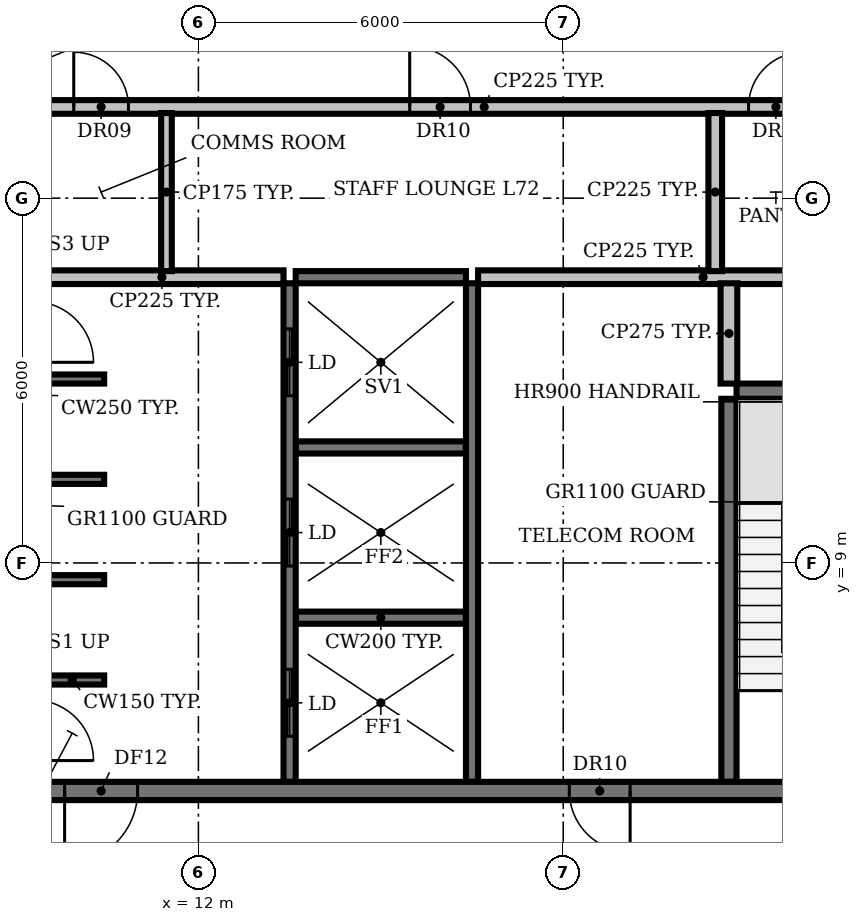
"""IFC4 building model, lengths in metres.
Left out: names, types, materials, properties, quantities, classifications, styles, units other than length and angle.
Written with IfcOpenShell. Run it as: python <this file> out.ifc"""

import sys

from ifc_helpers import new_model, si_unit, direction, frame, frame_2d, origin, place, context, subcontext, project, spatial, rectangle, extrude, element, fill, save


model = new_model("IFC4")
c1 = context("Model", 3, precision=1e-05, world=origin(), true_north=direction((0.0, 1.0)))
c2 = subcontext(c1, "Body", "Model", "MODEL_VIEW")
j1 = project(units=[si_unit("LENGTHUNIT", "METRE"), si_unit("PLANEANGLEUNIT", "RADIAN")], contexts=[c1])
p1 = place(None, origin())
s1 = spatial("IfcSite", under=j1, at=p1, CompositionType="ELEMENT")
p2 = place(p1, origin())
s2 = spatial("IfcBuilding", under=s1, at=p2, CompositionType="ELEMENT")
p3 = place(p2, frame((0.0, 0.0, 323.0)))
s3 = spatial("IfcBuildingStorey", under=s2, at=p3, CompositionType="ELEMENT", Elevation=323.0)
p4 = place(p3, frame((9.4, 7.075, 0.0), z_axis=(0.0, 0.0, 1.0), x_axis=(1.0, 0.0, 0.0)))
e1 = element("IfcWall", 1, at=p4, inside=s3, PredefinedType="SHEAR", context=c2, shape_type="SweptSolid", body=[
    extrude(rectangle(XDim=1.05, YDim=0.15, at=frame_2d((0.525, 0.0))), origin(), (0.0, 0.0, 1.0), 3.9),
])
p5 = place(p3, frame((13.6, 8.1, 0.0), z_axis=(0.0, 0.0, 1.0), x_axis=(1.0, 0.0, 0.0)))
e2 = element("IfcWall", 2, at=p5, inside=s3, PredefinedType="SHEAR", context=c2, shape_type="SweptSolid", body=[
    extrude(rectangle(XDim=2.8, YDim=0.2, at=frame_2d((1.4, 0.0))), origin(), (0.0, 0.0, 1.0), 3.9),
])
for number, where, z_axis, x_axis in (
    (3, (9.4, 8.725, 0.0), (0.0, 0.0, 1.0), (1.0, 0.0, 0.0)),
    (4, (9.4, 10.375, 0.0), (0.0, 0.0, 1.0), (1.0, 0.0, 0.0)),
):
    element("IfcWall", number, at=place(p3, frame(where, z_axis=z_axis, x_axis=x_axis)), inside=s3, PredefinedType="SHEAR", context=c2, shape_type="SweptSolid", body=[
        extrude(rectangle(XDim=1.05, YDim=0.15, at=frame_2d((0.525, 0.0))), origin(), (0.0, 0.0, 1.0), 3.9),
    ])
p6 = place(p3, frame((13.6, 10.9, 0.0), z_axis=(0.0, 0.0, 1.0), x_axis=(1.0, 0.0, 0.0)))
e5 = element("IfcWall", 5, at=p6, inside=s3, PredefinedType="SHEAR", context=c2, shape_type="SweptSolid", body=[
    extrude(rectangle(XDim=2.8, YDim=0.2, at=frame_2d((1.4, 0.0))), origin(), (0.0, 0.0, 1.0), 3.9),
])
p7 = place(p3, frame((20.85, 11.825, 0.0), z_axis=(0.0, 0.0, 1.0), x_axis=(1.0, 0.0, 0.0)))
e6 = element("IfcWall", 6, at=p7, inside=s3, PredefinedType="SHEAR", context=c2, shape_type="SweptSolid", body=[
    extrude(rectangle(XDim=3.15, YDim=0.25, at=frame_2d((1.575, 0.0))), origin(), (0.0, 0.0, 1.0), 3.9),
])
p8 = place(p3, frame((9.4, 12.025, 0.0), z_axis=(0.0, 0.0, 1.0), x_axis=(1.0, 0.0, 0.0)))
e7 = element("IfcWall", 7, at=p8, inside=s3, PredefinedType="SHEAR", context=c2, shape_type="SweptSolid", body=[
    extrude(rectangle(XDim=1.05, YDim=0.15, at=frame_2d((0.525, 0.0))), origin(), (0.0, 0.0, 1.0), 3.9),
])
p9 = place(p3, frame((9.4, 13.7, 0.0), z_axis=(0.0, 0.0, 1.0), x_axis=(1.0, 0.0, 0.0)))
e8 = element("IfcWall", 8, at=p9, inside=s3, PredefinedType="PARTITIONING", context=c2, shape_type="SweptSolid", body=[
    extrude(rectangle(XDim=4.0, YDim=0.225, at=frame_2d((2.0, 0.0))), origin(), (0.0, 0.0, 1.0), 3.9),
])
p10 = place(p3, frame((13.6, 13.7, 0.0), z_axis=(0.0, 0.0, 1.0), x_axis=(1.0, 0.0, 0.0)))
e9 = element("IfcWall", 9, at=p10, inside=s3, PredefinedType="SHEAR", context=c2, shape_type="SweptSolid", body=[
    extrude(rectangle(XDim=2.8, YDim=0.2, at=frame_2d((1.4, 0.0))), origin(), (0.0, 0.0, 1.0), 3.9),
])
p11 = place(p3, frame((16.6, 13.7, 0.0), z_axis=(0.0, 0.0, 1.0), x_axis=(1.0, 0.0, 0.0)))
e10 = element("IfcWall", 10, at=p11, inside=s3, PredefinedType="PARTITIONING", context=c2, shape_type="SweptSolid", body=[
    extrude(rectangle(XDim=7.4, YDim=0.225, at=frame_2d((3.7, 0.0))), origin(), (0.0, 0.0, 1.0), 3.9),
])
p12 = place(p3, frame((9.4, 16.5, 0.0), z_axis=(0.0, 0.0, 1.0), x_axis=(1.0, 0.0, 0.0)))
e11 = element("IfcWall", 11, at=p12, inside=s3, PredefinedType="PARTITIONING", context=c2, shape_type="SweptSolid", body=[
    extrude(rectangle(XDim=14.6, YDim=0.225, at=frame_2d((7.3, 0.0))), origin(), (0.0, 0.0, 1.0), 3.9),
])
p13 = place(p12, frame((0.55, 0.0, 0.0)))
e12 = element("IfcOpeningElement", 12, at=p13, cuts=e11, PredefinedType="OPENING", context=c2, shape_type="SweptSolid", body=[
    extrude(rectangle(XDim=0.9, YDim=2.1, at=frame_2d((0.45, 1.05))), frame((0.0, 0.123, 0.0), z_axis=(0.0, -1.0, 0.0), x_axis=(1.0, 0.0, 0.0)), (0.0, 0.0, 1.0), 0.245),
])
p14 = place(p12, frame((6.075, 0.0, 0.0)))
e13 = element("IfcOpeningElement", 13, at=p14, cuts=e11, PredefinedType="OPENING", context=c2, shape_type="SweptSolid", body=[
    extrude(rectangle(XDim=1.0, YDim=2.1, at=frame_2d((0.5, 1.05))), frame((0.0, 0.123, 0.0), z_axis=(0.0, -1.0, 0.0), x_axis=(1.0, 0.0, 0.0)), (0.0, 0.0, 1.0), 0.245),
])
p15 = place(p12, frame((11.647, 0.0, 0.0)))
e14 = element("IfcOpeningElement", 14, at=p15, cuts=e11, PredefinedType="OPENING", context=c2, shape_type="SweptSolid", body=[
    extrude(rectangle(XDim=0.9, YDim=2.1, at=frame_2d((0.45, 1.05))), frame((0.0, 0.123, 0.0), z_axis=(0.0, -1.0, 0.0), x_axis=(1.0, 0.0, 0.0)), (0.0, 0.0, 1.0), 0.245),
])
p16 = place(p12, frame((13.423, 0.0, 0.0)))
e15 = element("IfcOpeningElement", 15, at=p16, cuts=e11, PredefinedType="OPENING", context=c2, shape_type="SweptSolid", body=[
    extrude(rectangle(XDim=0.9, YDim=2.1, at=frame_2d((0.45, 1.05))), frame((0.0, 0.123, 0.0), z_axis=(0.0, -1.0, 0.0), x_axis=(1.0, 0.0, 0.0)), (0.0, 0.0, 1.0), 0.245),
])
p17 = place(p3, frame((11.475, 13.8, 0.0), z_axis=(0.0, 0.0, 1.0), x_axis=(0.0, 1.0, 0.0)))
e16 = element("IfcWall", 16, at=p17, inside=s3, PredefinedType="PARTITIONING", context=c2, shape_type="SweptSolid", body=[
    extrude(rectangle(XDim=2.6, YDim=0.175, at=frame_2d((1.3, 0.0))), origin(), (0.0, 0.0, 1.0), 3.9),
])
p18 = place(p3, frame((13.5, 5.4, 0.0), z_axis=(0.0, 0.0, 1.0), x_axis=(0.0, 1.0, 0.0)))
e17 = element("IfcWall", 17, at=p18, inside=s3, PredefinedType="SHEAR", context=c2, shape_type="SweptSolid", body=[
    extrude(rectangle(XDim=8.2, YDim=0.2, at=frame_2d((4.1, 0.0))), origin(), (0.0, 0.0, 1.0), 3.9),
])
p19 = place(p18, frame((0.75, 0.0, 0.0)))
e18 = element("IfcOpeningElement", 18, at=p19, cuts=e17, PredefinedType="OPENING", context=c2, shape_type="SweptSolid", body=[
    extrude(rectangle(XDim=1.1, YDim=2.1, at=frame_2d((0.55, 1.05))), frame((0.0, 0.11, 0.0), z_axis=(0.0, -1.0, 0.0), x_axis=(1.0, 0.0, 0.0)), (0.0, 0.0, 1.0), 0.22),
])
p20 = place(p18, frame((3.55, 0.0, 0.0)))
e19 = element("IfcOpeningElement", 19, at=p20, cuts=e17, PredefinedType="OPENING", context=c2, shape_type="SweptSolid", body=[
    extrude(rectangle(XDim=1.1, YDim=2.1, at=frame_2d((0.55, 1.05))), frame((0.0, 0.11, 0.0), z_axis=(0.0, -1.0, 0.0), x_axis=(1.0, 0.0, 0.0)), (0.0, 0.0, 1.0), 0.22),
])
p21 = place(p18, frame((6.35, 0.0, 0.0)))
e20 = element("IfcOpeningElement", 20, at=p21, cuts=e17, PredefinedType="OPENING", context=c2, shape_type="SweptSolid", body=[
    extrude(rectangle(XDim=1.1, YDim=2.1, at=frame_2d((0.55, 1.05))), frame((0.0, 0.11, 0.0), z_axis=(0.0, -1.0, 0.0), x_axis=(1.0, 0.0, 0.0)), (0.0, 0.0, 1.0), 0.22),
])
p22 = place(p3, frame((16.5, 5.4, 0.0), z_axis=(0.0, 0.0, 1.0), x_axis=(0.0, 1.0, 0.0)))
e21 = element("IfcWall", 21, at=p22, inside=s3, PredefinedType="SHEAR", context=c2, shape_type="SweptSolid", body=[
    extrude(rectangle(XDim=8.2, YDim=0.2, at=frame_2d((4.1, 0.0))), origin(), (0.0, 0.0, 1.0), 3.9),
])
p23 = place(p3, frame((20.5, 13.8, 0.0), z_axis=(0.0, 0.0, 1.0), x_axis=(0.0, 1.0, 0.0)))
e22 = element("IfcWall", 22, at=p23, inside=s3, PredefinedType="PARTITIONING", context=c2, shape_type="SweptSolid", body=[
    extrude(rectangle(XDim=2.6, YDim=0.225, at=frame_2d((1.3, 0.0))), origin(), (0.0, 0.0, 1.0), 3.9),
])
p24 = place(p3, frame((20.725, 5.4, 0.0), z_axis=(0.0, 0.0, 1.0), x_axis=(0.0, 1.0, 0.0)))
e23 = element("IfcWall", 23, at=p24, inside=s3, PredefinedType="SHEAR", context=c2, shape_type="SweptSolid", body=[
    extrude(rectangle(XDim=6.3, YDim=0.25, at=frame_2d((3.15, 0.0))), origin(), (0.0, 0.0, 1.0), 3.9),
])
p25 = place(p3, frame((20.725, 11.95, 0.0), z_axis=(0.0, 0.0, 1.0), x_axis=(0.0, 1.0, 0.0)))
e24 = element("IfcWall", 24, at=p25, inside=s3, PredefinedType="PARTITIONING", context=c2, shape_type="SweptSolid", body=[
    extrude(rectangle(XDim=1.65, YDim=0.275, at=frame_2d((0.825, 0.0))), origin(), (0.0, 0.0, 1.0), 3.9),
])
p26 = place(p3, frame((24.0, 5.25, 0.0), z_axis=(0.0, 0.0, 1.0), x_axis=(-1.0, 0.0, 0.0)))
e25 = element("IfcWall", 25, at=p26, inside=s3, PredefinedType="SHEAR", context=c2, shape_type="SweptSolid", body=[
    extrude(rectangle(XDim=18.0, YDim=0.3, at=frame_2d((9.0, 0.0))), origin(), (0.0, 0.0, 1.0), 3.9),
])
p27 = place(p26, frame((13.0, 0.0, 0.0)))
e26 = element("IfcOpeningElement", 26, at=p27, cuts=e25, PredefinedType="OPENING", context=c2, shape_type="SweptSolid", body=[
    extrude(rectangle(XDim=1.2, YDim=2.1, at=frame_2d((0.6, 1.05))), frame((0.0, 0.16, 0.0), z_axis=(0.0, -1.0, 0.0), x_axis=(1.0, 0.0, 0.0)), (0.0, 0.0, 1.0), 0.32),
])
p28 = place(p26, frame((4.9, 0.0, 0.0)))
e27 = element("IfcOpeningElement", 27, at=p28, cuts=e25, PredefinedType="OPENING", context=c2, shape_type="SweptSolid", body=[
    extrude(rectangle(XDim=1.0, YDim=2.1, at=frame_2d((0.5, 1.05))), frame((0.0, 0.16, 0.0), z_axis=(0.0, -1.0, 0.0), x_axis=(1.0, 0.0, 0.0)), (0.0, 0.0, 1.0), 0.32),
])
p29 = place(p13, origin())
e28 = element("IfcDoor", 28, at=p29, inside=s3, OperationType="SINGLE_SWING_LEFT", PredefinedType="DOOR", context=c2, shape_type="SweptSolid", body=[
    extrude(rectangle(XDim=0.9, YDim=2.1, at=frame_2d((0.45, 1.05))), frame((0.0, 0.025, 0.0), z_axis=(0.0, -1.0, 0.0), x_axis=(1.0, 0.0, 0.0)), (0.0, 0.0, 1.0), 0.05),
])
fill(e12, e28)
p30 = place(p14, origin())
e29 = element("IfcDoor", 29, at=p30, inside=s3, OperationType="SINGLE_SWING_LEFT", PredefinedType="DOOR", context=c2, shape_type="SweptSolid", body=[
    extrude(rectangle(XDim=1.0, YDim=2.1, at=frame_2d((0.5, 1.05))), frame((0.0, 0.025, 0.0), z_axis=(0.0, -1.0, 0.0), x_axis=(1.0, 0.0, 0.0)), (0.0, 0.0, 1.0), 0.05),
])
fill(e13, e29)
p31 = place(p15, origin())
e30 = element("IfcDoor", 30, at=p31, inside=s3, OperationType="SINGLE_SWING_RIGHT", PredefinedType="DOOR", context=c2, shape_type="SweptSolid", body=[
    extrude(rectangle(XDim=0.9, YDim=2.1, at=frame_2d((0.45, 1.05))), frame((0.0, 0.025, 0.0), z_axis=(0.0, -1.0, 0.0), x_axis=(1.0, 0.0, 0.0)), (0.0, 0.0, 1.0), 0.05),
])
fill(e14, e30)
p32 = place(p19, origin())
e31 = element("IfcDoor", 31, at=p32, inside=s3, OperationType="DOUBLE_DOOR_SLIDING", PredefinedType="DOOR", context=c2, shape_type="SweptSolid", body=[
    extrude(rectangle(XDim=1.1, YDim=2.1, at=frame_2d((0.55, 1.05))), frame((0.0, 0.025, 0.0), z_axis=(0.0, -1.0, 0.0), x_axis=(1.0, 0.0, 0.0)), (0.0, 0.0, 1.0), 0.05),
])
fill(e18, e31)
p33 = place(p20, origin())
e32 = element("IfcDoor", 32, at=p33, inside=s3, OperationType="DOUBLE_DOOR_SLIDING", PredefinedType="DOOR", context=c2, shape_type="SweptSolid", body=[
    extrude(rectangle(XDim=1.1, YDim=2.1, at=frame_2d((0.55, 1.05))), frame((0.0, 0.025, 0.0), z_axis=(0.0, -1.0, 0.0), x_axis=(1.0, 0.0, 0.0)), (0.0, 0.0, 1.0), 0.05),
])
fill(e19, e32)
p34 = place(p21, origin())
e33 = element("IfcDoor", 33, at=p34, inside=s3, OperationType="DOUBLE_DOOR_SLIDING", PredefinedType="DOOR", context=c2, shape_type="SweptSolid", body=[
    extrude(rectangle(XDim=1.1, YDim=2.1, at=frame_2d((0.55, 1.05))), frame((0.0, 0.025, 0.0), z_axis=(0.0, -1.0, 0.0), x_axis=(1.0, 0.0, 0.0)), (0.0, 0.0, 1.0), 0.05),
])
fill(e20, e33)
p35 = place(p27, origin())
e34 = element("IfcDoor", 34, at=p35, inside=s3, OperationType="SINGLE_SWING_RIGHT", PredefinedType="DOOR", context=c2, shape_type="SweptSolid", body=[
    extrude(rectangle(XDim=1.2, YDim=2.1, at=frame_2d((0.6, 1.05))), frame((0.0, 0.025, 0.0), z_axis=(0.0, -1.0, 0.0), x_axis=(1.0, 0.0, 0.0)), (0.0, 0.0, 1.0), 0.05),
])
fill(e26, e34)
p36 = place(p28, origin())
e35 = element("IfcDoor", 35, at=p36, inside=s3, OperationType="SINGLE_SWING_LEFT", PredefinedType="DOOR", context=c2, shape_type="SweptSolid", body=[
    extrude(rectangle(XDim=1.0, YDim=2.1, at=frame_2d((0.5, 1.05))), frame((0.0, 0.025, 0.0), z_axis=(0.0, -1.0, 0.0), x_axis=(1.0, 0.0, 0.0)), (0.0, 0.0, 1.0), 0.05),
])
fill(e27, e35)
save(model, sys.argv[1])
